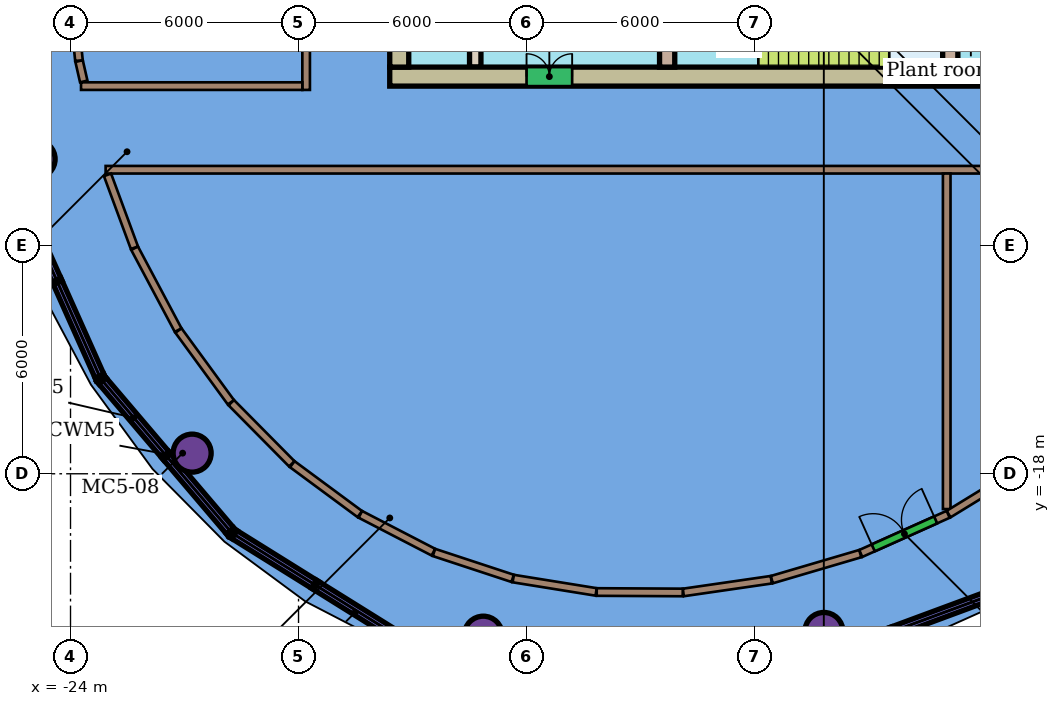
"""IFC4 building model, lengths in metres.
Left out: names, types, materials, properties, quantities, classifications, styles, units other than length and angle.
Written with IfcOpenShell. Run it as: python <this file> out.ifc"""

import sys

from ifc_helpers import new_model, si_unit, direction, frame, frame_2d, origin, origin_2d, place, context, subcontext, project, spatial, rectangle, hollow_circle, extrude, element, fill, save


model = new_model("IFC4")
c1 = context("Model", 3, precision=1e-05, world=origin(), true_north=direction((0.0, 1.0)))
c2 = subcontext(c1, "Body", "Model", "MODEL_VIEW")
j1 = project(units=[si_unit("LENGTHUNIT", "METRE"), si_unit("PLANEANGLEUNIT", "RADIAN")], contexts=[c1])
p1 = place(None, origin())
s1 = spatial("IfcSite", under=j1, at=p1, CompositionType="ELEMENT")
p2 = place(p1, origin())
s2 = spatial("IfcBuilding", under=s1, at=p2, CompositionType="ELEMENT")
p3 = place(p2, frame((0.0, 0.0, 317.1)))
s3 = spatial("IfcBuildingStorey", under=s2, at=p3, CompositionType="ELEMENT", Elevation=317.1)
for number, where, z_axis, x_axis in (
    (1, (-24.906, -9.72, 0.0), (0.0, 0.0, 1.0), (1.0, 0.0, 0.0)),
    (2, (-20.8, -17.457, 0.0), (0.0, 0.0, 1.0), (1.0, 0.0, 0.0)),
    (3, (-13.138, -22.247, 0.0), (0.0, 0.0, 1.0), (1.0, 0.0, 0.0)),
    (4, (-4.175, -22.149, 0.0), (0.0, 0.0, 1.0), (1.0, 0.0, 0.0)),
):
    element("IfcColumn", number, at=place(p3, frame(where, z_axis=z_axis, x_axis=x_axis)), inside=s3, PredefinedType="COLUMN", context=c2, shape_type="SweptSolid", body=[
        extrude(hollow_circle(Radius=0.5, WallThickness=0.04, at=origin_2d()), origin(), (0.0, 0.0, 1.0), 4.0),
    ])
p4 = place(p3, frame((-17.8, -7.9, 0.0), z_axis=(0.0, 0.0, 1.0), x_axis=(0.0, 1.0, 0.0)))
e5 = element("IfcWall", 5, at=p4, inside=s3, PredefinedType="PARTITIONING", context=c2, shape_type="SweptSolid", body=[
    extrude(rectangle(XDim=17.8, YDim=0.2, at=frame_2d((8.9, 0.0))), origin(), (0.0, 0.0, 1.0), 3.65),
])
p5 = place(p3, frame((-23.076, -10.0, 0.0), z_axis=(0.0, 0.0, 1.0), x_axis=(1.0, 0.0, 0.0)))
e6 = element("IfcWall", 6, at=p5, inside=s3, PredefinedType="PARTITIONING", context=c2, shape_type="SweptSolid", body=[
    extrude(rectangle(XDim=28.976, YDim=0.2, at=frame_2d((14.488, 0.0))), origin(), (0.0, 0.0, 1.0), 3.65),
])
p6 = place(p3, frame((-23.724, -7.8, 0.0), z_axis=(0.0, 0.0, 1.0), x_axis=(1.0, 0.0, 0.0)))
e7 = element("IfcWall", 7, at=p6, inside=s3, PredefinedType="PARTITIONING", context=c2, shape_type="SweptSolid", body=[
    extrude(rectangle(XDim=5.824, YDim=0.2, at=frame_2d((2.912, 0.0))), origin(), (0.0, 0.0, 1.0), 3.65),
])
p7 = place(p3, frame((-23.775, -7.141, 0.0), z_axis=(0.0, 0.0, 1.0), x_axis=(0.2234024776, -0.974726286196, 0.0)))
e8 = element("IfcWall", 8, at=p7, inside=s3, PredefinedType="PARTITIONING", context=c2, shape_type="SweptSolid", body=[
    extrude(rectangle(XDim=0.551, YDim=0.2, at=frame_2d((0.275, 0.0))), origin(), (0.0, 0.0, 1.0), 3.65),
])
p8 = place(p3, frame((-23.777, -7.129, 0.0), z_axis=(0.0, 0.0, 1.0), x_axis=(-0.102877560919, 0.994694027055, 0.0)))
e9 = element("IfcWall", 9, at=p8, inside=s3, PredefinedType="PARTITIONING", context=c2, shape_type="SweptSolid", body=[
    extrude(rectangle(XDim=2.701, YDim=0.2, at=frame_2d((1.35, 0.0))), origin(), (0.0, 0.0, 1.0), 3.65),
])
p9 = place(p8, frame((0.45, 0.0, 0.0)))
e10 = element("IfcOpeningElement", 10, at=p9, cuts=e9, PredefinedType="OPENING", context=c2, shape_type="SweptSolid", body=[
    extrude(rectangle(XDim=1.8, YDim=2.4, at=frame_2d((0.9, 1.2))), frame((0.0, 0.11, 0.0), z_axis=(0.0, -1.0, 0.0), x_axis=(1.0, 0.0, 0.0)), (0.0, 0.0, 1.0), 0.22),
])
p10 = place(p3, frame((-0.944, -18.929, 0.0), z_axis=(0.0, 0.0, 1.0), x_axis=(0.0, 1.0, 0.0)))
e11 = element("IfcWall", 11, at=p10, inside=s3, PredefinedType="PARTITIONING", context=c2, shape_type="SweptSolid", body=[
    extrude(rectangle(XDim=8.829, YDim=0.2, at=frame_2d((4.415, 0.0))), origin(), (0.0, 0.0, 1.0), 3.65),
])
p11 = place(p3, frame((-0.894, -19.061, 0.0), z_axis=(0.0, 0.0, 1.0), x_axis=(0.852667029926, 0.522454721557, 0.0)))
e12 = element("IfcWall", 12, at=p11, inside=s3, PredefinedType="PARTITIONING", context=c2, shape_type="SweptSolid", body=[
    extrude(rectangle(XDim=2.614, YDim=0.2, at=frame_2d((1.307, 0.0))), origin(), (0.0, 0.0, 1.0), 3.65),
])
p12 = place(p3, frame((-3.206, -20.097, 0.0), z_axis=(0.0, 0.0, 1.0), x_axis=(0.912552955942, 0.408958558538, 0.0)))
e13 = element("IfcWall", 13, at=p12, inside=s3, PredefinedType="PARTITIONING", context=c2, shape_type="SweptSolid", body=[
    extrude(rectangle(XDim=2.521, YDim=0.2, at=frame_2d((1.26, 0.0))), origin(), (0.0, 0.0, 1.0), 3.65),
])
p13 = place(p12, frame((0.36, 0.0, 0.0)))
e14 = element("IfcOpeningElement", 14, at=p13, cuts=e13, PredefinedType="OPENING", context=c2, shape_type="SweptSolid", body=[
    extrude(rectangle(XDim=1.8, YDim=2.4, at=frame_2d((0.9, 1.2))), frame((0.0, 0.11, 0.0), z_axis=(0.0, -1.0, 0.0), x_axis=(1.0, 0.0, 0.0)), (0.0, 0.0, 1.0), 0.22),
])
p14 = place(p3, frame((-5.547, -20.786, 0.0), z_axis=(0.0, 0.0, 1.0), x_axis=(0.95934146389, 0.28224803925, 0.0)))
e15 = element("IfcWall", 15, at=p14, inside=s3, PredefinedType="PARTITIONING", context=c2, shape_type="SweptSolid", body=[
    extrude(rectangle(XDim=2.426, YDim=0.2, at=frame_2d((1.213, 0.0))), origin(), (0.0, 0.0, 1.0), 3.65),
])
p15 = place(p3, frame((-7.875, -21.123, 0.0), z_axis=(0.0, 0.0, 1.0), x_axis=(0.989671979467, 0.143350525141, 0.0)))
e16 = element("IfcWall", 16, at=p15, inside=s3, PredefinedType="PARTITIONING", context=c2, shape_type="SweptSolid", body=[
    extrude(rectangle(XDim=2.338, YDim=0.2, at=frame_2d((1.169, 0.0))), origin(), (0.0, 0.0, 1.0), 3.65),
])
p16 = place(p3, frame((-10.154, -21.111, 0.0), z_axis=(0.0, 0.0, 1.0), x_axis=(0.999986603133, -0.005176248997, 0.0)))
e17 = element("IfcWall", 17, at=p16, inside=s3, PredefinedType="PARTITIONING", context=c2, shape_type="SweptSolid", body=[
    extrude(rectangle(XDim=2.264, YDim=0.2, at=frame_2d((1.132, 0.0))), origin(), (0.0, 0.0, 1.0), 3.65),
])
p17 = place(p3, frame((-12.35, -20.757, 0.0), z_axis=(0.0, 0.0, 1.0), x_axis=(0.987257926423, -0.159128208423, 0.0)))
e18 = element("IfcWall", 18, at=p17, inside=s3, PredefinedType="PARTITIONING", context=c2, shape_type="SweptSolid", body=[
    extrude(rectangle(XDim=2.209, YDim=0.2, at=frame_2d((1.104, 0.0))), origin(), (0.0, 0.0, 1.0), 3.65),
])
p18 = place(p3, frame((-14.437, -20.07, 0.0), z_axis=(0.0, 0.0, 1.0), x_axis=(0.949852302688, -0.312698901627, 0.0)))
e19 = element("IfcWall", 19, at=p18, inside=s3, PredefinedType="PARTITIONING", context=c2, shape_type="SweptSolid", body=[
    extrude(rectangle(XDim=2.181, YDim=0.2, at=frame_2d((1.09, 0.0))), origin(), (0.0, 0.0, 1.0), 3.65),
])
p19 = place(p3, frame((-16.373, -19.068, 0.0), z_axis=(0.0, 0.0, 1.0), x_axis=(0.888068415533, -0.45971131086, 0.0)))
e20 = element("IfcWall", 20, at=p19, inside=s3, PredefinedType="PARTITIONING", context=c2, shape_type="SweptSolid", body=[
    extrude(rectangle(XDim=2.165, YDim=0.2, at=frame_2d((1.082, 0.0))), origin(), (0.0, 0.0, 1.0), 3.65),
])
p20 = place(p3, frame((-18.165, -17.748, 0.0), z_axis=(0.0, 0.0, 1.0), x_axis=(0.80443326696, -0.594043027909, 0.0)))
e21 = element("IfcWall", 21, at=p20, inside=s3, PredefinedType="PARTITIONING", context=c2, shape_type="SweptSolid", body=[
    extrude(rectangle(XDim=2.209, YDim=0.2, at=frame_2d((1.105, 0.0))), origin(), (0.0, 0.0, 1.0), 3.65),
])
p21 = place(p3, frame((-19.77, -16.129, 0.0), z_axis=(0.0, 0.0, 1.0), x_axis=(0.703376280453, -0.710817703843, 0.0)))
e22 = element("IfcWall", 22, at=p21, inside=s3, PredefinedType="PARTITIONING", context=c2, shape_type="SweptSolid", body=[
    extrude(rectangle(XDim=2.264, YDim=0.2, at=frame_2d((1.132, 0.0))), origin(), (0.0, 0.0, 1.0), 3.65),
])
p22 = place(p3, frame((-21.16, -14.231, 0.0), z_axis=(0.0, 0.0, 1.0), x_axis=(0.590082027637, -0.807343297897, 0.0)))
e23 = element("IfcWall", 23, at=p22, inside=s3, PredefinedType="PARTITIONING", context=c2, shape_type="SweptSolid", body=[
    extrude(rectangle(XDim=2.338, YDim=0.2, at=frame_2d((1.169, 0.0))), origin(), (0.0, 0.0, 1.0), 3.65),
])
p23 = place(p3, frame((-22.314, -12.065, 0.0), z_axis=(0.0, 0.0, 1.0), x_axis=(0.469606334902, -0.882875920059, 0.0)))
e24 = element("IfcWall", 24, at=p23, inside=s3, PredefinedType="PARTITIONING", context=c2, shape_type="SweptSolid", body=[
    extrude(rectangle(XDim=2.44, YDim=0.2, at=frame_2d((1.22, 0.0))), origin(), (0.0, 0.0, 1.0), 3.65),
])
p24 = place(p3, frame((-23.026, -10.135, 0.0), z_axis=(0.0, 0.0, 1.0), x_axis=(0.346197844841, -0.938161527791, 0.0)))
e25 = element("IfcWall", 25, at=p24, inside=s3, PredefinedType="PARTITIONING", context=c2, shape_type="SweptSolid", body=[
    extrude(rectangle(XDim=2.044, YDim=0.2, at=frame_2d((1.022, 0.0))), origin(), (0.0, 0.0, 1.0), 3.65),
])
p25 = place(p3, frame((-15.6, -7.55, 0.0), z_axis=(0.0, 0.0, 1.0), x_axis=(1.0, 0.0, 0.0)))
e26 = element("IfcWall", 26, at=p25, inside=s3, PredefinedType="SHEAR", context=c2, shape_type="SweptSolid", body=[
    extrude(rectangle(XDim=19.2, YDim=0.5, at=frame_2d((9.6, 0.0))), origin(), (0.0, 0.0, 1.0), 3.9),
])
p26 = place(p25, frame((3.6, 0.0, 0.0)))
e27 = element("IfcOpeningElement", 27, at=p26, cuts=e26, PredefinedType="OPENING", context=c2, shape_type="SweptSolid", body=[
    extrude(rectangle(XDim=1.2, YDim=2.1, at=frame_2d((0.6, 1.05))), frame((0.0, 0.26, 0.0), z_axis=(0.0, -1.0, 0.0), x_axis=(1.0, 0.0, 0.0)), (0.0, 0.0, 1.0), 0.52),
])
p27 = place(p3, frame((-15.35, 7.3, 0.0), z_axis=(0.0, 0.0, 1.0), x_axis=(0.0, -1.0, 0.0)))
e28 = element("IfcWall", 28, at=p27, inside=s3, PredefinedType="SHEAR", context=c2, shape_type="SweptSolid", body=[
    extrude(rectangle(XDim=14.6, YDim=0.5, at=frame_2d((7.3, 0.0))), origin(), (0.0, 0.0, 1.0), 3.9),
])
p28 = place(p27, frame((10.6, 0.0, 0.0)))
e29 = element("IfcOpeningElement", 29, at=p28, cuts=e28, PredefinedType="OPENING", context=c2, shape_type="SweptSolid", body=[
    extrude(rectangle(XDim=1.2, YDim=2.1, at=frame_2d((0.6, 1.05))), frame((0.0, 0.26, 0.0), z_axis=(0.0, -1.0, 0.0), x_axis=(1.0, 0.0, 0.0)), (0.0, 0.0, 1.0), 0.52),
])
p29 = place(p27, frame((2.8, 0.0, 0.0)))
e30 = element("IfcOpeningElement", 30, at=p29, cuts=e28, PredefinedType="OPENING", context=c2, shape_type="SweptSolid", body=[
    extrude(rectangle(XDim=1.2, YDim=2.1, at=frame_2d((0.6, 1.05))), frame((0.0, 0.26, 0.0), z_axis=(0.0, -1.0, 0.0), x_axis=(1.0, 0.0, 0.0)), (0.0, 0.0, 1.0), 0.52),
])
p30 = place(p3, frame((-13.35, 7.3, 0.0), z_axis=(0.0, 0.0, 1.0), x_axis=(0.0, -1.0, 0.0)))
e31 = element("IfcWall", 31, at=p30, inside=s3, PredefinedType="SHEAR", context=c2, shape_type="SweptSolid", body=[
    extrude(rectangle(XDim=14.6, YDim=0.3, at=frame_2d((7.3, 0.0))), origin(), (0.0, 0.0, 1.0), 3.9),
])
p31 = place(p30, frame((6.55, 0.0, 0.0)))
e32 = element("IfcOpeningElement", 32, at=p31, cuts=e31, PredefinedType="OPENING", context=c2, shape_type="SweptSolid", body=[
    extrude(rectangle(XDim=1.5, YDim=2.1, at=frame_2d((0.75, 1.05))), frame((0.0, 0.16, 0.0), z_axis=(0.0, -1.0, 0.0), x_axis=(1.0, 0.0, 0.0)), (0.0, 0.0, 1.0), 0.32),
])
p32 = place(p3, frame((-8.3, -3.88, 0.0), z_axis=(0.0, 0.0, 1.0), x_axis=(0.0, -1.0, 0.0)))
e33 = element("IfcWall", 33, at=p32, inside=s3, PredefinedType="SHEAR", context=c2, shape_type="SweptSolid", body=[
    extrude(rectangle(XDim=3.42, YDim=0.4, at=frame_2d((1.71, 0.0))), origin(), (0.0, 0.0, 1.0), 3.9),
])
p33 = place(p32, frame((1.11, 0.0, 0.0)))
e34 = element("IfcOpeningElement", 34, at=p33, cuts=e33, PredefinedType="OPENING", context=c2, shape_type="SweptSolid", body=[
    extrude(rectangle(XDim=1.2, YDim=2.1, at=frame_2d((0.6, 1.05))), frame((0.0, 0.21, 0.0), z_axis=(0.0, -1.0, 0.0), x_axis=(1.0, 0.0, 0.0)), (0.0, 0.0, 1.0), 0.42),
])
p34 = place(p3, frame((-0.85, -3.88, 0.0), z_axis=(0.0, 0.0, 1.0), x_axis=(0.0, -1.0, 0.0)))
e35 = element("IfcWall", 35, at=p34, inside=s3, PredefinedType="SHEAR", context=c2, shape_type="SweptSolid", body=[
    extrude(rectangle(XDim=3.42, YDim=0.4, at=frame_2d((1.71, 0.0))), origin(), (0.0, 0.0, 1.0), 3.9),
])
p35 = place(p13, origin())
e36 = element("IfcDoor", 36, at=p35, inside=s3, OperationType="DOUBLE_DOOR_SINGLE_SWING", PredefinedType="DOOR", context=c2, shape_type="SweptSolid", body=[
    extrude(rectangle(XDim=1.8, YDim=2.4, at=frame_2d((0.9, 1.2))), frame((0.0, 0.025, 0.0), z_axis=(0.0, -1.0, 0.0), x_axis=(1.0, 0.0, 0.0)), (0.0, 0.0, 1.0), 0.05),
])
fill(e14, e36)
p36 = place(p26, origin())
e37 = element("IfcDoor", 37, at=p36, inside=s3, OperationType="DOUBLE_DOOR_SINGLE_SWING", PredefinedType="NOTDEFINED", context=c2, shape_type="SweptSolid", body=[
    extrude(rectangle(XDim=1.2, YDim=2.1, at=frame_2d((0.6, 1.05))), frame((0.0, 0.025, 0.0), z_axis=(0.0, -1.0, 0.0), x_axis=(1.0, 0.0, 0.0)), (0.0, 0.0, 1.0), 0.05),
])
fill(e27, e37)
save(model, sys.argv[1])
